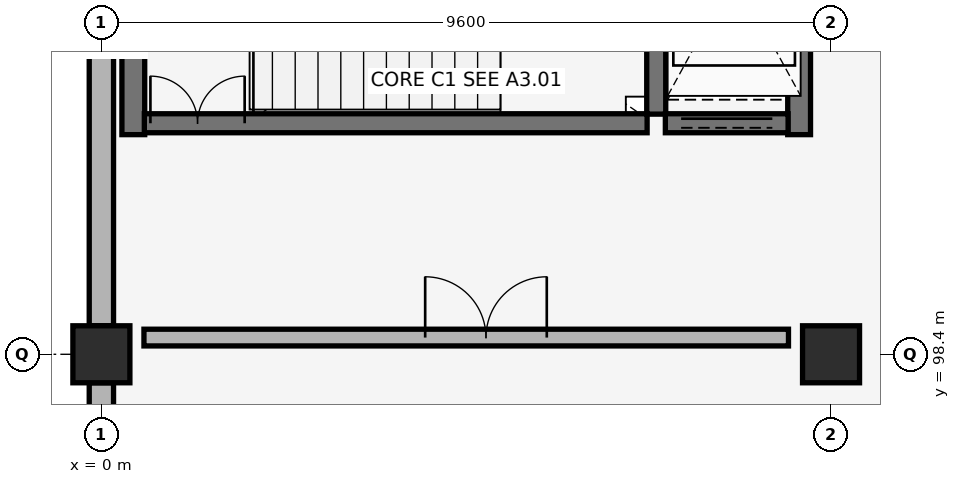
"""IFC4 building model, lengths in metres.
Left out: names, types, materials, properties, quantities, classifications, styles, units other than length and angle.
Written with IfcOpenShell. Run it as: python <this file> out.ifc"""

import sys

from ifc_helpers import new_model, si_unit, direction, frame, frame_2d, origin, origin_2d, place, context, subcontext, project, spatial, rectangle, extrude, element, fill, save


model = new_model("IFC4")
c1 = context("Model", 3, precision=1e-05, world=origin(), true_north=direction((0.0, 1.0)))
c2 = subcontext(c1, "Body", "Model", "MODEL_VIEW")
j1 = project(units=[si_unit("LENGTHUNIT", "METRE"), si_unit("PLANEANGLEUNIT", "RADIAN")], contexts=[c1])
p1 = place(None, origin())
s1 = spatial("IfcSite", under=j1, at=p1, CompositionType="ELEMENT")
p2 = place(p1, origin())
s2 = spatial("IfcBuilding", under=s1, at=p2, CompositionType="ELEMENT")
p3 = place(p2, frame((0.0, 0.0, 4.42)))
s3 = spatial("IfcBuildingStorey", under=s2, at=p3, CompositionType="ELEMENT", Elevation=4.42)
for number, where, z_axis, x_axis in (
    (1, (0.0, 98.4, 0.0), (0.0, 0.0, 1.0), (1.0, 0.0, 0.0)),
    (2, (9.6, 98.4, 0.0), (0.0, 0.0, 1.0), (1.0, 0.0, 0.0)),
):
    element("IfcColumn", number, at=place(p3, frame(where, z_axis=z_axis, x_axis=x_axis)), inside=s3, PredefinedType="COLUMN", context=c2, shape_type="SweptSolid", body=[
        extrude(rectangle(XDim=0.75, YDim=0.75, at=origin_2d()), origin(), (0.0, 0.0, 1.0), 4.08),
    ])
p4 = place(p3, frame((0.0, 98.025, 0.0), z_axis=(0.0, 0.0, 1.0), x_axis=(0.0, -1.0, 0.0)))
e3 = element("IfcWall", 3, at=p4, inside=s3, PredefinedType="SOLIDWALL", context=c2, shape_type="SweptSolid", body=[
    extrude(rectangle(XDim=6.45, YDim=0.32, at=frame_2d((3.225, 0.0))), origin(), (0.0, 0.0, 1.0), 3.08),
])
p5 = place(p3, frame((0.0, 105.225, 0.0), z_axis=(0.0, 0.0, 1.0), x_axis=(0.0, -1.0, 0.0)))
e4 = element("IfcWall", 4, at=p5, inside=s3, PredefinedType="SOLIDWALL", context=c2, shape_type="SweptSolid", body=[
    extrude(rectangle(XDim=6.45, YDim=0.32, at=frame_2d((3.225, 0.0))), origin(), (0.0, 0.0, 1.0), 3.08),
])
for number, where, z_axis, x_axis in (
    (5, (0.42, 101.29, 0.0), (0.0, 0.0, 1.0), (0.0, 1.0, 0.0)),
    (6, (9.18, 101.29, 0.0), (0.0, 0.0, 1.0), (0.0, 1.0, 0.0)),
):
    element("IfcWall", number, at=place(p3, frame(where, z_axis=z_axis, x_axis=x_axis)), inside=s3, PredefinedType="SHEAR", context=c2, shape_type="SweptSolid", body=[
        extrude(rectangle(XDim=4.1, YDim=0.3, at=frame_2d((2.05, 0.0))), origin(), (0.0, 0.0, 1.0), 3.8),
    ])
p6 = place(p3, frame((7.3, 101.56, 0.0), z_axis=(0.0, 0.0, 1.0), x_axis=(0.0, 1.0, 0.0)))
e7 = element("IfcWall", 7, at=p6, inside=s3, PredefinedType="SHEAR", context=c2, shape_type="SweptSolid", body=[
    extrude(rectangle(XDim=3.53, YDim=0.25, at=frame_2d((1.765, 0.0))), origin(), (0.0, 0.0, 1.0), 3.8),
])
p7 = place(p3, frame((0.565, 101.44, 0.0), z_axis=(0.0, 0.0, 1.0), x_axis=(1.0, 0.0, 0.0)))
e8 = element("IfcWall", 8, at=p7, inside=s3, PredefinedType="SHEAR", context=c2, shape_type="SweptSolid", body=[
    extrude(rectangle(XDim=6.615, YDim=0.25, at=frame_2d((3.308, 0.0))), origin(), (0.0, 0.0, 1.0), 3.8),
])
p8 = place(p7, frame((0.08, 0.0, 0.0)))
e9 = element("IfcOpeningElement", 9, at=p8, cuts=e8, PredefinedType="OPENING", context=c2, shape_type="SweptSolid", body=[
    extrude(rectangle(XDim=1.24, YDim=2.15, at=frame_2d((0.62, 1.075))), frame((0.0, 0.135, 0.0), z_axis=(0.0, -1.0, 0.0), x_axis=(1.0, 0.0, 0.0)), (0.0, 0.0, 1.0), 0.27),
])
p9 = place(p3, frame((0.56, 98.62, 0.0), z_axis=(0.0, 0.0, 1.0), x_axis=(1.0, 0.0, 0.0)))
e10 = element("IfcWall", 10, at=p9, inside=s3, PredefinedType="PARTITIONING", context=c2, shape_type="SweptSolid", body=[
    extrude(rectangle(XDim=8.48, YDim=0.22, at=frame_2d((4.24, 0.0))), origin(), (0.0, 0.0, 1.0), 3.13),
])
p10 = place(p9, frame((3.7, 0.0, 0.0)))
e11 = element("IfcOpeningElement", 11, at=p10, cuts=e10, PredefinedType="OPENING", context=c2, shape_type="SweptSolid", body=[
    extrude(rectangle(XDim=1.6, YDim=2.2, at=frame_2d((0.8, 1.1))), frame((0.0, 0.12, 0.0), z_axis=(0.0, -1.0, 0.0), x_axis=(1.0, 0.0, 0.0)), (0.0, 0.0, 1.0), 0.24),
])
p11 = place(p3, frame((7.42, 101.44, 0.0), z_axis=(0.0, 0.0, 1.0), x_axis=(1.0, 0.0, 0.0)))
e12 = element("IfcWall", 12, at=p11, inside=s3, PredefinedType="SHEAR", context=c2, shape_type="SweptSolid", body=[
    extrude(rectangle(XDim=1.615, YDim=0.25, at=frame_2d((0.808, 0.0))), origin(), (0.0, 0.0, 1.0), 3.8),
])
p12 = place(p11, frame((0.208, 0.0, 0.0)))
e13 = element("IfcOpeningElement", 13, at=p12, cuts=e12, PredefinedType="OPENING", context=c2, shape_type="SweptSolid", body=[
    extrude(rectangle(XDim=1.2, YDim=2.15, at=frame_2d((0.6, 1.075))), frame((0.0, 0.135, 0.0), z_axis=(0.0, -1.0, 0.0), x_axis=(1.0, 0.0, 0.0)), (0.0, 0.0, 1.0), 0.27),
])
p13 = place(p8, origin())
e14 = element("IfcDoor", 14, at=p13, inside=s3, OperationType="DOUBLE_DOOR_SINGLE_SWING", PredefinedType="DOOR", context=c2, shape_type="SweptSolid", body=[
    extrude(rectangle(XDim=1.24, YDim=2.15, at=frame_2d((0.62, 1.075))), frame((0.0, 0.025, 0.0), z_axis=(0.0, -1.0, 0.0), x_axis=(1.0, 0.0, 0.0)), (0.0, 0.0, 1.0), 0.05),
])
fill(e9, e14)
p14 = place(p10, origin())
e15 = element("IfcDoor", 15, at=p14, inside=s3, OperationType="DOUBLE_DOOR_SINGLE_SWING", PredefinedType="DOOR", context=c2, shape_type="SweptSolid", body=[
    extrude(rectangle(XDim=1.6, YDim=2.2, at=frame_2d((0.8, 1.1))), frame((0.0, 0.025, 0.0), z_axis=(0.0, -1.0, 0.0), x_axis=(1.0, 0.0, 0.0)), (0.0, 0.0, 1.0), 0.05),
])
fill(e11, e15)
p15 = place(p12, origin())
e16 = element("IfcDoor", 16, at=p15, inside=s3, OperationType="DOUBLE_DOOR_SLIDING", PredefinedType="DOOR", context=c2, shape_type="SweptSolid", body=[
    extrude(rectangle(XDim=1.2, YDim=2.15, at=frame_2d((0.6, 1.075))), frame((0.0, 0.025, 0.0), z_axis=(0.0, -1.0, 0.0), x_axis=(1.0, 0.0, 0.0)), (0.0, 0.0, 1.0), 0.05),
])
fill(e13, e16)
save(model, sys.argv[1])
